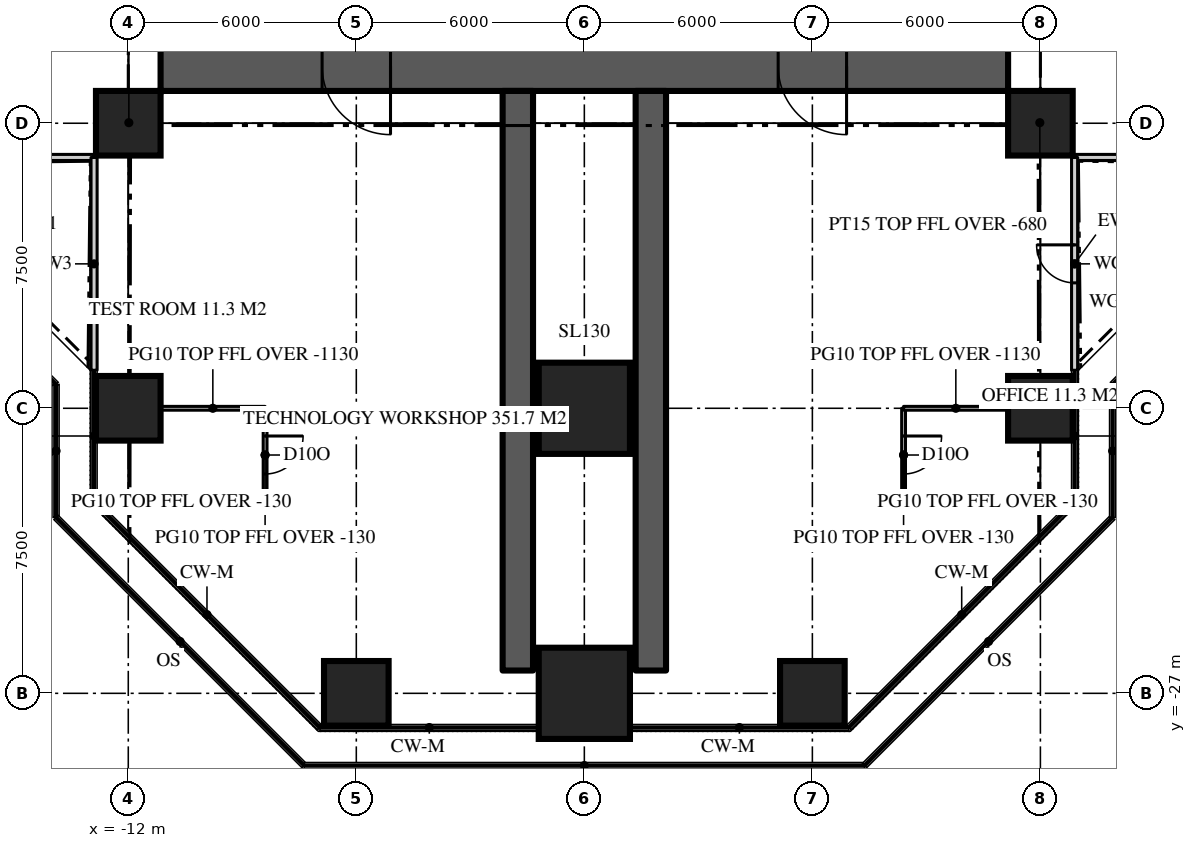
"""IFC4 building model, lengths in metres.
Left out: names, types, materials, properties, quantities, classifications, styles, units other than length and angle.
Written with IfcOpenShell. Run it as: python <this file> out.ifc"""

import sys

from ifc_helpers import new_model, si_unit, direction, frame, frame_2d, origin, origin_2d, place, context, subcontext, project, spatial, rectangle, extrude, element, fill, save


model = new_model("IFC4")
c1 = context("Model", 3, precision=1e-05, world=origin(), true_north=direction((0.0, 1.0)))
c2 = subcontext(c1, "Body", "Model", "MODEL_VIEW")
j1 = project(units=[si_unit("LENGTHUNIT", "METRE"), si_unit("PLANEANGLEUNIT", "RADIAN")], contexts=[c1])
p1 = place(None, origin())
s1 = spatial("IfcSite", under=j1, at=p1, CompositionType="ELEMENT")
p2 = place(p1, origin())
s2 = spatial("IfcBuilding", under=s1, at=p2, CompositionType="ELEMENT")
p3 = place(p2, frame((0.0, 0.0, 147.6)))
s3 = spatial("IfcBuildingStorey", under=s2, at=p3, CompositionType="ELEMENT", Elevation=147.6)
p4 = place(p3, frame((11.15, -10.5, 0.0), z_axis=(0.0, 0.0, 1.0), x_axis=(-1.0, 0.0, 0.0)))
e1 = element("IfcWall", 1, at=p4, inside=s3, PredefinedType="SHEAR", context=c2, shape_type="SweptSolid", body=[
    extrude(rectangle(XDim=22.3, YDim=1.3, at=frame_2d((11.15, 0.0))), origin(), (0.0, 0.0, 1.0), 3.9),
])
p5 = place(p4, frame((16.25, 0.0, 0.0)))
e2 = element("IfcOpeningElement", 2, at=p5, cuts=e1, PredefinedType="OPENING", context=c2, shape_type="SweptSolid", body=[
    extrude(rectangle(XDim=1.8, YDim=2.2, at=frame_2d((0.9, 1.1))), frame((0.0, 0.66, 0.0), z_axis=(0.0, -1.0, 0.0), x_axis=(1.0, 0.0, 0.0)), (0.0, 0.0, 1.0), 1.32),
])
p6 = place(p4, frame((4.25, 0.0, 0.0)))
e3 = element("IfcOpeningElement", 3, at=p6, cuts=e1, PredefinedType="OPENING", context=c2, shape_type="SweptSolid", body=[
    extrude(rectangle(XDim=1.8, YDim=2.2, at=frame_2d((0.9, 1.1))), frame((0.0, 0.66, 0.0), z_axis=(0.0, -1.0, 0.0), x_axis=(1.0, 0.0, 0.0)), (0.0, 0.0, 1.0), 1.32),
])
for number, where, z_axis, x_axis in (
    (4, (-1.75, -11.15, 0.0), (0.0, 0.0, 1.0), (0.0, -1.0, 0.0)),
    (5, (1.75, -11.15, 0.0), (0.0, 0.0, 1.0), (0.0, -1.0, 0.0)),
):
    element("IfcWall", number, at=place(p3, frame(where, z_axis=z_axis, x_axis=x_axis)), inside=s3, PredefinedType="SHEAR", context=c2, shape_type="SweptSolid", body=[
        extrude(rectangle(XDim=15.25, YDim=0.8, at=frame_2d((7.625, 0.0))), origin(), (0.0, 0.0, 1.0), 3.9),
    ])
p7 = place(p3, frame((-6.0, -27.0, 0.0), z_axis=(0.0, 0.0, 1.0), x_axis=(1.0, 0.0, 0.0)))
e6 = element("IfcColumn", 6, at=p7, inside=s3, PredefinedType="COLUMN", context=c2, shape_type="SweptSolid", body=[
    extrude(rectangle(XDim=1.7, YDim=1.7, at=origin_2d()), origin(), (0.0, 0.0, 1.0), 3.9),
])
p8 = place(p3, frame((0.0, -27.0, 0.0), z_axis=(0.0, 0.0, 1.0), x_axis=(1.0, 0.0, 0.0)))
e7 = element("IfcColumn", 7, at=p8, inside=s3, PredefinedType="COLUMN", context=c2, shape_type="SweptSolid", body=[
    extrude(rectangle(XDim=2.4, YDim=2.4, at=origin_2d()), origin(), (0.0, 0.0, 1.0), 3.9),
])
for number, where, z_axis, x_axis in (
    (8, (6.0, -27.0, 0.0), (0.0, 0.0, 1.0), (1.0, 0.0, 0.0)),
    (9, (-12.0, -19.5, 0.0), (0.0, 0.0, 1.0), (1.0, 0.0, 0.0)),
):
    element("IfcColumn", number, at=place(p3, frame(where, z_axis=z_axis, x_axis=x_axis)), inside=s3, PredefinedType="COLUMN", context=c2, shape_type="SweptSolid", body=[
        extrude(rectangle(XDim=1.7, YDim=1.7, at=origin_2d()), origin(), (0.0, 0.0, 1.0), 3.9),
    ])
p9 = place(p3, frame((0.0, -19.5, 0.0), z_axis=(0.0, 0.0, 1.0), x_axis=(1.0, 0.0, 0.0)))
e10 = element("IfcColumn", 10, at=p9, inside=s3, PredefinedType="COLUMN", context=c2, shape_type="SweptSolid", body=[
    extrude(rectangle(XDim=2.4, YDim=2.4, at=origin_2d()), origin(), (0.0, 0.0, 1.0), 3.9),
])
for number, where, z_axis, x_axis in (
    (11, (12.0, -19.5, 0.0), (0.0, 0.0, 1.0), (1.0, 0.0, 0.0)),
    (12, (-12.0, -12.0, 0.0), (0.0, 0.0, 1.0), (1.0, 0.0, 0.0)),
    (13, (12.0, -12.0, 0.0), (0.0, 0.0, 1.0), (1.0, 0.0, 0.0)),
):
    element("IfcColumn", number, at=place(p3, frame(where, z_axis=z_axis, x_axis=x_axis)), inside=s3, PredefinedType="COLUMN", context=c2, shape_type="SweptSolid", body=[
        extrude(rectangle(XDim=1.7, YDim=1.7, at=origin_2d()), origin(), (0.0, 0.0, 1.0), 3.9),
    ])
p10 = place(p3, frame((12.9, -12.9, 0.0), z_axis=(0.0, 0.0, 1.0), x_axis=(1.0, 0.0, 0.0)))
e14 = element("IfcWall", 14, at=p10, inside=s3, PredefinedType="SOLIDWALL", context=c2, shape_type="SweptSolid", body=[
    extrude(rectangle(XDim=5.6, YDim=0.16, at=frame_2d((2.8, 0.0))), origin(), (0.0, 0.0, 1.0), 3.77),
])
p11 = place(p3, frame((-18.5, -12.9, 0.0), z_axis=(0.0, 0.0, 1.0), x_axis=(1.0, 0.0, 0.0)))
e15 = element("IfcWall", 15, at=p11, inside=s3, PredefinedType="SOLIDWALL", context=c2, shape_type="SweptSolid", body=[
    extrude(rectangle(XDim=5.6, YDim=0.16, at=frame_2d((2.8, 0.0))), origin(), (0.0, 0.0, 1.0), 3.77),
])
p12 = place(p11, frame((2.3, 0.0, 0.0)))
e16 = element("IfcOpeningElement", 16, at=p12, cuts=e15, PredefinedType="OPENING", context=c2, shape_type="SweptSolid", body=[
    extrude(rectangle(XDim=1.0, YDim=2.2, at=frame_2d((0.5, 1.1))), frame((0.0, 0.09, 0.0), z_axis=(0.0, -1.0, 0.0), x_axis=(1.0, 0.0, 0.0)), (0.0, 0.0, 1.0), 0.18),
])
p13 = place(p3, frame((-12.9, -12.9, 0.0), z_axis=(0.0, 0.0, 1.0), x_axis=(0.0, -1.0, 0.0)))
e17 = element("IfcWall", 17, at=p13, inside=s3, PredefinedType="SOLIDWALL", context=c2, shape_type="SweptSolid", body=[
    extrude(rectangle(XDim=5.6, YDim=0.16, at=frame_2d((2.8, 0.0))), origin(), (0.0, 0.0, 1.0), 3.77),
])
p14 = place(p3, frame((12.9, -18.5, 0.0), z_axis=(0.0, 0.0, 1.0), x_axis=(0.0, 1.0, 0.0)))
e18 = element("IfcWall", 18, at=p14, inside=s3, PredefinedType="SOLIDWALL", context=c2, shape_type="SweptSolid", body=[
    extrude(rectangle(XDim=5.6, YDim=0.16, at=frame_2d((2.8, 0.0))), origin(), (0.0, 0.0, 1.0), 3.77),
])
p15 = place(p14, frame((2.3, 0.0, 0.0)))
e19 = element("IfcOpeningElement", 19, at=p15, cuts=e18, PredefinedType="OPENING", context=c2, shape_type="SweptSolid", body=[
    extrude(rectangle(XDim=1.0, YDim=2.2, at=frame_2d((0.5, 1.1))), frame((0.0, 0.09, 0.0), z_axis=(0.0, -1.0, 0.0), x_axis=(1.0, 0.0, 0.0)), (0.0, 0.0, 1.0), 0.18),
])
p16 = place(p3, frame((8.4, -19.5, 0.0), z_axis=(0.0, 0.0, 1.0), x_axis=(0.0, -1.0, 0.0)))
e20 = element("IfcWall", 20, at=p16, inside=s3, PredefinedType="PARTITIONING", context=c2, shape_type="SweptSolid", body=[
    extrude(rectangle(XDim=2.459, YDim=0.1, at=frame_2d((1.229, 0.0))), origin(), (0.0, 0.0, 1.0), 3.77),
])
p17 = place(p16, frame((0.729, 0.0, 0.0)))
e21 = element("IfcOpeningElement", 21, at=p17, cuts=e20, PredefinedType="OPENING", context=c2, shape_type="SweptSolid", body=[
    extrude(rectangle(XDim=1.0, YDim=2.2, at=frame_2d((0.5, 1.1))), frame((0.0, 0.06, 0.0), z_axis=(0.0, -1.0, 0.0), x_axis=(1.0, 0.0, 0.0)), (0.0, 0.0, 1.0), 0.12),
])
p18 = place(p3, frame((8.4, -19.5, 0.0), z_axis=(0.0, 0.0, 1.0), x_axis=(1.0, 0.0, 0.0)))
e22 = element("IfcWall", 22, at=p18, inside=s3, PredefinedType="PARTITIONING", context=c2, shape_type="SweptSolid", body=[
    extrude(rectangle(XDim=2.75, YDim=0.1, at=frame_2d((1.375, 0.0))), origin(), (0.0, 0.0, 1.0), 2.77),
])
p19 = place(p3, frame((8.4, -21.959, 0.0), z_axis=(0.0, 0.0, 1.0), x_axis=(1.0, 0.0, 0.0)))
e23 = element("IfcWall", 23, at=p19, inside=s3, PredefinedType="PARTITIONING", context=c2, shape_type="SweptSolid", body=[
    extrude(rectangle(XDim=4.42, YDim=0.1, at=frame_2d((2.21, 0.0))), origin(), (0.0, 0.0, 1.0), 3.77),
])
p20 = place(p3, frame((-8.4, -19.5, 0.0), z_axis=(0.0, 0.0, 1.0), x_axis=(0.0, -1.0, 0.0)))
e24 = element("IfcWall", 24, at=p20, inside=s3, PredefinedType="PARTITIONING", context=c2, shape_type="SweptSolid", body=[
    extrude(rectangle(XDim=2.459, YDim=0.1, at=frame_2d((1.229, 0.0))), origin(), (0.0, 0.0, 1.0), 3.77),
])
p21 = place(p20, frame((0.729, 0.0, 0.0)))
e25 = element("IfcOpeningElement", 25, at=p21, cuts=e24, PredefinedType="OPENING", context=c2, shape_type="SweptSolid", body=[
    extrude(rectangle(XDim=1.0, YDim=2.2, at=frame_2d((0.5, 1.1))), frame((0.0, 0.06, 0.0), z_axis=(0.0, -1.0, 0.0), x_axis=(1.0, 0.0, 0.0)), (0.0, 0.0, 1.0), 0.12),
])
p22 = place(p3, frame((-8.4, -19.5, 0.0), z_axis=(0.0, 0.0, 1.0), x_axis=(-1.0, 0.0, 0.0)))
e26 = element("IfcWall", 26, at=p22, inside=s3, PredefinedType="PARTITIONING", context=c2, shape_type="SweptSolid", body=[
    extrude(rectangle(XDim=2.75, YDim=0.1, at=frame_2d((1.375, 0.0))), origin(), (0.0, 0.0, 1.0), 2.77),
])
p23 = place(p3, frame((-8.4, -21.959, 0.0), z_axis=(0.0, 0.0, 1.0), x_axis=(-1.0, 0.0, 0.0)))
e27 = element("IfcWall", 27, at=p23, inside=s3, PredefinedType="PARTITIONING", context=c2, shape_type="SweptSolid", body=[
    extrude(rectangle(XDim=4.42, YDim=0.1, at=frame_2d((2.21, 0.0))), origin(), (0.0, 0.0, 1.0), 3.77),
])
for number, where, z_axis, x_axis in (
    (28, (-11.15, -11.15, 0.0), (0.0, 0.0, 1.0), (-0.707, -0.707, 0.0)),
    (29, (11.15, -11.15, 0.0), (0.0, 0.0, 1.0), (0.707, -0.707, 0.0)),
):
    element("IfcWall", number, at=place(p3, frame(where, z_axis=z_axis, x_axis=x_axis)), inside=s3, PredefinedType="PARTITIONING", context=c2, shape_type="SweptSolid", body=[
        extrude(rectangle(XDim=2.362, YDim=0.15, at=frame_2d((1.181, 0.0))), origin(), (0.0, 0.0, 1.0), 3.22),
    ])
p24 = place(p15, origin())
e30 = element("IfcDoor", 30, at=p24, inside=s3, OperationType="SINGLE_SWING_RIGHT", PredefinedType="DOOR", context=c2, shape_type="SweptSolid", body=[
    extrude(rectangle(XDim=1.0, YDim=2.2, at=frame_2d((0.5, 1.1))), frame((0.0, 0.025, 0.0), z_axis=(0.0, -1.0, 0.0), x_axis=(1.0, 0.0, 0.0)), (0.0, 0.0, 1.0), 0.05),
])
fill(e19, e30)
p25 = place(p5, origin())
e31 = element("IfcDoor", 31, at=p25, inside=s3, OperationType="DOUBLE_DOOR_DOUBLE_SWING", PredefinedType="DOOR", context=c2, shape_type="SweptSolid", body=[
    extrude(rectangle(XDim=1.8, YDim=2.2, at=frame_2d((0.9, 1.1))), frame((0.0, 0.025, 0.0), z_axis=(0.0, -1.0, 0.0), x_axis=(1.0, 0.0, 0.0)), (0.0, 0.0, 1.0), 0.05),
])
fill(e2, e31)
p26 = place(p6, origin())
e32 = element("IfcDoor", 32, at=p26, inside=s3, OperationType="DOUBLE_DOOR_DOUBLE_SWING", PredefinedType="DOOR", context=c2, shape_type="SweptSolid", body=[
    extrude(rectangle(XDim=1.8, YDim=2.2, at=frame_2d((0.9, 1.1))), frame((0.0, 0.025, 0.0), z_axis=(0.0, -1.0, 0.0), x_axis=(1.0, 0.0, 0.0)), (0.0, 0.0, 1.0), 0.05),
])
fill(e3, e32)
p27 = place(p17, origin())
e33 = element("IfcDoor", 33, at=p27, inside=s3, OperationType="SINGLE_SWING_LEFT", PredefinedType="DOOR", context=c2, shape_type="SweptSolid", body=[
    extrude(rectangle(XDim=1.0, YDim=2.2, at=frame_2d((0.5, 1.1))), frame((0.0, 0.025, 0.0), z_axis=(0.0, -1.0, 0.0), x_axis=(1.0, 0.0, 0.0)), (0.0, 0.0, 1.0), 0.05),
])
fill(e21, e33)
p28 = place(p21, origin())
e34 = element("IfcDoor", 34, at=p28, inside=s3, OperationType="SINGLE_SWING_LEFT", PredefinedType="DOOR", context=c2, shape_type="SweptSolid", body=[
    extrude(rectangle(XDim=1.0, YDim=2.2, at=frame_2d((0.5, 1.1))), frame((0.0, 0.025, 0.0), z_axis=(0.0, -1.0, 0.0), x_axis=(1.0, 0.0, 0.0)), (0.0, 0.0, 1.0), 0.05),
])
fill(e25, e34)
save(model, sys.argv[1])
